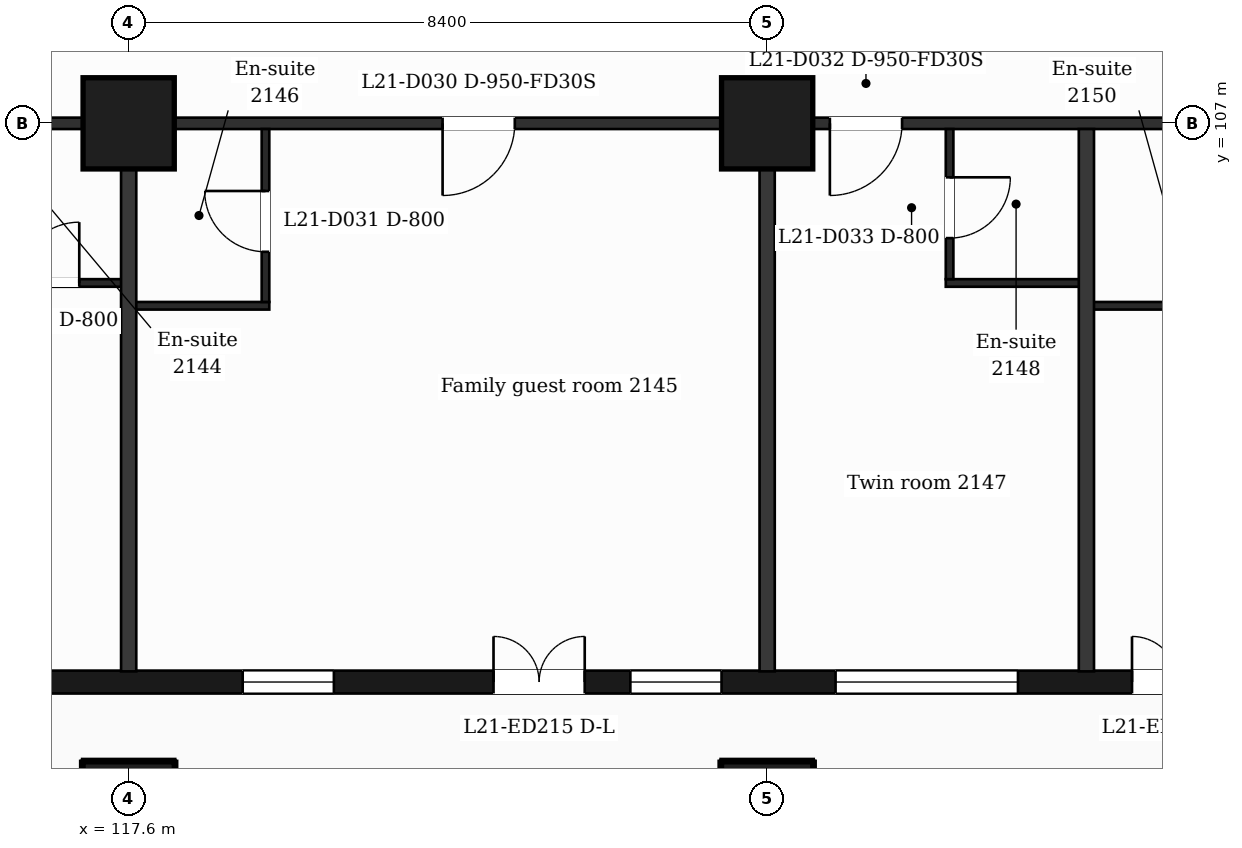
"""IFC4 building model, lengths in metres.
Left out: names, types, materials, properties, quantities, classifications, styles, units other than length and angle.
Written with IfcOpenShell. Run it as: python <this file> out.ifc"""

import sys

from ifc_helpers import new_model, si_unit, direction, frame, frame_2d, origin, origin_2d, place, context, subcontext, project, spatial, rectangle, extrude, element, fill, save


model = new_model("IFC4")
c1 = context("Model", 3, precision=1e-05, world=origin(), true_north=direction((0.0, 1.0)))
c2 = subcontext(c1, "Body", "Model", "MODEL_VIEW")
j1 = project(units=[si_unit("LENGTHUNIT", "METRE"), si_unit("PLANEANGLEUNIT", "RADIAN")], contexts=[c1])
p1 = place(None, origin())
s1 = spatial("IfcSite", under=j1, at=p1, CompositionType="ELEMENT")
p2 = place(p1, origin())
s2 = spatial("IfcBuilding", under=s1, at=p2, CompositionType="ELEMENT")
p3 = place(p2, frame((0.0, 0.0, 94.7)))
s3 = spatial("IfcBuildingStorey", under=s2, at=p3, CompositionType="ELEMENT", Elevation=94.7)
for number, where, z_axis, x_axis in (
    (1, (117.6, 98.0, 0.0), (0.0, 0.0, 1.0), (1.0, 0.0, 0.0)),
    (2, (126.0, 98.0, 0.0), (0.0, 0.0, 1.0), (1.0, 0.0, 0.0)),
    (3, (117.6, 107.0, 0.0), (0.0, 0.0, 1.0), (1.0, 0.0, 0.0)),
    (4, (126.0, 107.0, 0.0), (0.0, 0.0, 1.0), (1.0, 0.0, 0.0)),
):
    element("IfcColumn", number, at=place(p3, frame(where, z_axis=z_axis, x_axis=x_axis)), inside=s3, PredefinedType="COLUMN", context=c2, shape_type="SweptSolid", body=[
        extrude(rectangle(XDim=1.2, YDim=1.2, at=origin_2d()), origin(), (0.0, 0.0, 1.0), 3.7),
    ])
p4 = place(p3, frame((89.85, 99.65, 0.0), z_axis=(0.0, 0.0, 1.0), x_axis=(1.0, 0.0, 0.0)))
e5 = element("IfcWall", 5, at=p4, inside=s3, PredefinedType="SOLIDWALL", context=c2, shape_type="SweptSolid", body=[
    extrude(rectangle(XDim=47.25, YDim=0.3, at=frame_2d((23.625, 0.0))), origin(), (0.0, 0.0, 1.0), 3.38),
])
p5 = place(p4, frame((0.725, 0.0, 0.9)))
e6 = element("IfcOpeningElement", 6, at=p5, cuts=e5, PredefinedType="OPENING", context=c2, shape_type="SweptSolid", body=[
    extrude(rectangle(XDim=1.2, YDim=2.1, at=frame_2d((0.6, 1.05))), frame((0.0, 0.16, 0.0), z_axis=(0.0, -1.0, 0.0), x_axis=(1.0, 0.0, 0.0)), (0.0, 0.0, 1.0), 0.32),
])
p6 = place(p4, frame((3.45, 0.0, 0.9)))
e7 = element("IfcOpeningElement", 7, at=p6, cuts=e5, PredefinedType="OPENING", context=c2, shape_type="SweptSolid", body=[
    extrude(rectangle(XDim=2.4, YDim=2.1, at=frame_2d((1.2, 1.05))), frame((0.0, 0.16, 0.0), z_axis=(0.0, -1.0, 0.0), x_axis=(1.0, 0.0, 0.0)), (0.0, 0.0, 1.0), 0.32),
])
p7 = place(p4, frame((7.65, 0.0, 0.9)))
e8 = element("IfcOpeningElement", 8, at=p7, cuts=e5, PredefinedType="OPENING", context=c2, shape_type="SweptSolid", body=[
    extrude(rectangle(XDim=2.4, YDim=2.1, at=frame_2d((1.2, 1.05))), frame((0.0, 0.16, 0.0), z_axis=(0.0, -1.0, 0.0), x_axis=(1.0, 0.0, 0.0)), (0.0, 0.0, 1.0), 0.32),
])
p8 = place(p4, frame((11.85, 0.0, 0.9)))
e9 = element("IfcOpeningElement", 9, at=p8, cuts=e5, PredefinedType="OPENING", context=c2, shape_type="SweptSolid", body=[
    extrude(rectangle(XDim=2.4, YDim=2.1, at=frame_2d((1.2, 1.05))), frame((0.0, 0.16, 0.0), z_axis=(0.0, -1.0, 0.0), x_axis=(1.0, 0.0, 0.0)), (0.0, 0.0, 1.0), 0.32),
])
p9 = place(p4, frame((16.05, 0.0, 0.9)))
e10 = element("IfcOpeningElement", 10, at=p9, cuts=e5, PredefinedType="OPENING", context=c2, shape_type="SweptSolid", body=[
    extrude(rectangle(XDim=2.4, YDim=2.1, at=frame_2d((1.2, 1.05))), frame((0.0, 0.16, 0.0), z_axis=(0.0, -1.0, 0.0), x_axis=(1.0, 0.0, 0.0)), (0.0, 0.0, 1.0), 0.32),
])
p10 = place(p4, frame((20.25, 0.0, 0.9)))
e11 = element("IfcOpeningElement", 11, at=p10, cuts=e5, PredefinedType="OPENING", context=c2, shape_type="SweptSolid", body=[
    extrude(rectangle(XDim=2.4, YDim=2.1, at=frame_2d((1.2, 1.05))), frame((0.0, 0.16, 0.0), z_axis=(0.0, -1.0, 0.0), x_axis=(1.0, 0.0, 0.0)), (0.0, 0.0, 1.0), 0.32),
])
p11 = place(p4, frame((25.05, 0.0, 0.9)))
e12 = element("IfcOpeningElement", 12, at=p11, cuts=e5, PredefinedType="OPENING", context=c2, shape_type="SweptSolid", body=[
    extrude(rectangle(XDim=1.2, YDim=2.1, at=frame_2d((0.6, 1.05))), frame((0.0, 0.16, 0.0), z_axis=(0.0, -1.0, 0.0), x_axis=(1.0, 0.0, 0.0)), (0.0, 0.0, 1.0), 0.32),
])
p12 = place(p4, frame((29.25, 0.0, 0.9)))
e13 = element("IfcOpeningElement", 13, at=p12, cuts=e5, PredefinedType="OPENING", context=c2, shape_type="SweptSolid", body=[
    extrude(rectangle(XDim=1.2, YDim=2.1, at=frame_2d((0.6, 1.05))), frame((0.0, 0.16, 0.0), z_axis=(0.0, -1.0, 0.0), x_axis=(1.0, 0.0, 0.0)), (0.0, 0.0, 1.0), 0.32),
])
p13 = place(p4, frame((32.55, 0.0, 0.0)))
e14 = element("IfcOpeningElement", 14, at=p13, cuts=e5, PredefinedType="OPENING", context=c2, shape_type="SweptSolid", body=[
    extrude(rectangle(XDim=1.2, YDim=2.4, at=frame_2d((0.6, 1.2))), frame((0.0, 0.16, 0.0), z_axis=(0.0, -1.0, 0.0), x_axis=(1.0, 0.0, 0.0)), (0.0, 0.0, 1.0), 0.32),
])
p14 = place(p4, frame((34.35, 0.0, 0.9)))
e15 = element("IfcOpeningElement", 15, at=p14, cuts=e5, PredefinedType="OPENING", context=c2, shape_type="SweptSolid", body=[
    extrude(rectangle(XDim=1.2, YDim=2.1, at=frame_2d((0.6, 1.05))), frame((0.0, 0.16, 0.0), z_axis=(0.0, -1.0, 0.0), x_axis=(1.0, 0.0, 0.0)), (0.0, 0.0, 1.0), 0.32),
])
p15 = place(p4, frame((37.05, 0.0, 0.9)))
e16 = element("IfcOpeningElement", 16, at=p15, cuts=e5, PredefinedType="OPENING", context=c2, shape_type="SweptSolid", body=[
    extrude(rectangle(XDim=2.4, YDim=2.1, at=frame_2d((1.2, 1.05))), frame((0.0, 0.16, 0.0), z_axis=(0.0, -1.0, 0.0), x_axis=(1.0, 0.0, 0.0)), (0.0, 0.0, 1.0), 0.32),
])
p16 = place(p4, frame((40.95, 0.0, 0.0)))
e17 = element("IfcOpeningElement", 17, at=p16, cuts=e5, PredefinedType="OPENING", context=c2, shape_type="SweptSolid", body=[
    extrude(rectangle(XDim=1.2, YDim=2.4, at=frame_2d((0.6, 1.2))), frame((0.0, 0.16, 0.0), z_axis=(0.0, -1.0, 0.0), x_axis=(1.0, 0.0, 0.0)), (0.0, 0.0, 1.0), 0.32),
])
p17 = place(p4, frame((42.75, 0.0, 0.9)))
e18 = element("IfcOpeningElement", 18, at=p17, cuts=e5, PredefinedType="OPENING", context=c2, shape_type="SweptSolid", body=[
    extrude(rectangle(XDim=1.2, YDim=2.1, at=frame_2d((0.6, 1.05))), frame((0.0, 0.16, 0.0), z_axis=(0.0, -1.0, 0.0), x_axis=(1.0, 0.0, 0.0)), (0.0, 0.0, 1.0), 0.32),
])
p18 = place(p4, frame((45.25, 0.0, 0.9)))
e19 = element("IfcOpeningElement", 19, at=p18, cuts=e5, PredefinedType="OPENING", context=c2, shape_type="SweptSolid", body=[
    extrude(rectangle(XDim=1.2, YDim=2.1, at=frame_2d((0.6, 1.05))), frame((0.0, 0.16, 0.0), z_axis=(0.0, -1.0, 0.0), x_axis=(1.0, 0.0, 0.0)), (0.0, 0.0, 1.0), 0.32),
])
p19 = place(p3, frame((117.6, 104.6, 0.0), z_axis=(0.0, 0.0, 1.0), x_axis=(1.0, 0.0, 0.0)))
e20 = element("IfcWall", 20, at=p19, inside=s3, PredefinedType="PARTITIONING", context=c2, shape_type="SweptSolid", body=[
    extrude(rectangle(XDim=1.85, YDim=0.1, at=frame_2d((0.925, 0.0))), origin(), (0.0, 0.0, 1.0), 3.38),
])
p20 = place(p3, frame((130.2, 104.6, 0.0), z_axis=(0.0, 0.0, 1.0), x_axis=(1.0, 0.0, 0.0)))
e21 = element("IfcWall", 21, at=p20, inside=s3, PredefinedType="PARTITIONING", context=c2, shape_type="SweptSolid", body=[
    extrude(rectangle(XDim=2.15, YDim=0.1, at=frame_2d((1.075, 0.0))), origin(), (0.0, 0.0, 1.0), 3.38),
])
p21 = place(p3, frame((115.45, 104.9, 0.0), z_axis=(0.0, 0.0, 1.0), x_axis=(1.0, 0.0, 0.0)))
e22 = element("IfcWall", 22, at=p21, inside=s3, PredefinedType="PARTITIONING", context=c2, shape_type="SweptSolid", body=[
    extrude(rectangle(XDim=2.15, YDim=0.1, at=frame_2d((1.075, 0.0))), origin(), (0.0, 0.0, 1.0), 3.38),
])
p22 = place(p21, frame((0.7, 0.0, 0.0)))
e23 = element("IfcOpeningElement", 23, at=p22, cuts=e22, PredefinedType="OPENING", context=c2, shape_type="SweptSolid", body=[
    extrude(rectangle(XDim=0.8, YDim=2.1, at=frame_2d((0.4, 1.05))), frame((0.0, 0.06, 0.0), z_axis=(0.0, -1.0, 0.0), x_axis=(1.0, 0.0, 0.0)), (0.0, 0.0, 1.0), 0.12),
])
p23 = place(p3, frame((128.35, 104.9, 0.0), z_axis=(0.0, 0.0, 1.0), x_axis=(1.0, 0.0, 0.0)))
e24 = element("IfcWall", 24, at=p23, inside=s3, PredefinedType="PARTITIONING", context=c2, shape_type="SweptSolid", body=[
    extrude(rectangle(XDim=1.85, YDim=0.1, at=frame_2d((0.925, 0.0))), origin(), (0.0, 0.0, 1.0), 3.38),
])
p24 = place(p3, frame((87.018, 107.0, 0.0), z_axis=(0.0, 0.0, 1.0), x_axis=(1.0, 0.0, 0.0)))
e25 = element("IfcWall", 25, at=p24, inside=s3, PredefinedType="PARTITIONING", context=c2, shape_type="SweptSolid", body=[
    extrude(rectangle(XDim=52.765, YDim=0.15, at=frame_2d((26.382, 0.0))), origin(), (0.0, 0.0, 1.0), 3.38),
])
p25 = place(p24, frame((0.707, 0.0, 0.0)))
e26 = element("IfcOpeningElement", 26, at=p25, cuts=e25, PredefinedType="OPENING", context=c2, shape_type="SweptSolid", body=[
    extrude(rectangle(XDim=0.95, YDim=2.1, at=frame_2d((0.475, 1.05))), frame((0.0, 0.085, 0.0), z_axis=(0.0, -1.0, 0.0), x_axis=(1.0, 0.0, 0.0)), (0.0, 0.0, 1.0), 0.17),
])
p26 = place(p24, frame((6.982, 0.0, 0.0)))
e27 = element("IfcOpeningElement", 27, at=p26, cuts=e25, PredefinedType="OPENING", context=c2, shape_type="SweptSolid", body=[
    extrude(rectangle(XDim=1.0, YDim=2.1, at=frame_2d((0.5, 1.05))), frame((0.0, 0.085, 0.0), z_axis=(0.0, -1.0, 0.0), x_axis=(1.0, 0.0, 0.0)), (0.0, 0.0, 1.0), 0.17),
])
p27 = place(p24, frame((16.457, 0.0, 0.0)))
e28 = element("IfcOpeningElement", 28, at=p27, cuts=e25, PredefinedType="OPENING", context=c2, shape_type="SweptSolid", body=[
    extrude(rectangle(XDim=0.95, YDim=2.1, at=frame_2d((0.475, 1.05))), frame((0.0, 0.085, 0.0), z_axis=(0.0, -1.0, 0.0), x_axis=(1.0, 0.0, 0.0)), (0.0, 0.0, 1.0), 0.17),
])
p28 = place(p24, frame((18.445, 0.0, 0.0)))
e29 = element("IfcOpeningElement", 29, at=p28, cuts=e25, PredefinedType="OPENING", context=c2, shape_type="SweptSolid", body=[
    extrude(rectangle(XDim=0.95, YDim=2.1, at=frame_2d((0.475, 1.05))), frame((0.0, 0.085, 0.0), z_axis=(0.0, -1.0, 0.0), x_axis=(1.0, 0.0, 0.0)), (0.0, 0.0, 1.0), 0.17),
])
p29 = place(p24, frame((25.157, 0.0, 0.0)))
e30 = element("IfcOpeningElement", 30, at=p29, cuts=e25, PredefinedType="OPENING", context=c2, shape_type="SweptSolid", body=[
    extrude(rectangle(XDim=0.95, YDim=2.1, at=frame_2d((0.475, 1.05))), frame((0.0, 0.085, 0.0), z_axis=(0.0, -1.0, 0.0), x_axis=(1.0, 0.0, 0.0)), (0.0, 0.0, 1.0), 0.17),
])
p30 = place(p24, frame((27.07, 0.0, 0.0)))
e31 = element("IfcOpeningElement", 31, at=p30, cuts=e25, PredefinedType="OPENING", context=c2, shape_type="SweptSolid", body=[
    extrude(rectangle(XDim=0.95, YDim=2.1, at=frame_2d((0.475, 1.05))), frame((0.0, 0.085, 0.0), z_axis=(0.0, -1.0, 0.0), x_axis=(1.0, 0.0, 0.0)), (0.0, 0.0, 1.0), 0.17),
])
p31 = place(p24, frame((34.712, 0.0, 0.0)))
e32 = element("IfcOpeningElement", 32, at=p31, cuts=e25, PredefinedType="OPENING", context=c2, shape_type="SweptSolid", body=[
    extrude(rectangle(XDim=0.95, YDim=2.1, at=frame_2d((0.475, 1.05))), frame((0.0, 0.085, 0.0), z_axis=(0.0, -1.0, 0.0), x_axis=(1.0, 0.0, 0.0)), (0.0, 0.0, 1.0), 0.17),
])
p32 = place(p24, frame((39.807, 0.0, 0.0)))
e33 = element("IfcOpeningElement", 33, at=p32, cuts=e25, PredefinedType="OPENING", context=c2, shape_type="SweptSolid", body=[
    extrude(rectangle(XDim=0.95, YDim=2.1, at=frame_2d((0.475, 1.05))), frame((0.0, 0.085, 0.0), z_axis=(0.0, -1.0, 0.0), x_axis=(1.0, 0.0, 0.0)), (0.0, 0.0, 1.0), 0.17),
])
p33 = place(p24, frame((45.622, 0.0, 0.0)))
e34 = element("IfcOpeningElement", 34, at=p33, cuts=e25, PredefinedType="OPENING", context=c2, shape_type="SweptSolid", body=[
    extrude(rectangle(XDim=0.95, YDim=2.1, at=frame_2d((0.475, 1.05))), frame((0.0, 0.085, 0.0), z_axis=(0.0, -1.0, 0.0), x_axis=(1.0, 0.0, 0.0)), (0.0, 0.0, 1.0), 0.17),
])
p34 = place(p24, frame((48.974, 0.0, 0.0)))
e35 = element("IfcOpeningElement", 35, at=p34, cuts=e25, PredefinedType="OPENING", context=c2, shape_type="SweptSolid", body=[
    extrude(rectangle(XDim=0.95, YDim=2.1, at=frame_2d((0.475, 1.05))), frame((0.0, 0.085, 0.0), z_axis=(0.0, -1.0, 0.0), x_axis=(1.0, 0.0, 0.0)), (0.0, 0.0, 1.0), 0.17),
])
p35 = place(p3, frame((117.6, 99.79, 0.0), z_axis=(0.0, 0.0, 1.0), x_axis=(0.0, 1.0, 0.0)))
e36 = element("IfcWall", 36, at=p35, inside=s3, PredefinedType="PARTITIONING", context=c2, shape_type="SweptSolid", body=[
    extrude(rectangle(XDim=7.135, YDim=0.2, at=frame_2d((3.567, 0.0))), origin(), (0.0, 0.0, 1.0), 3.38),
])
p36 = place(p3, frame((119.4, 104.65, 0.0), z_axis=(0.0, 0.0, 1.0), x_axis=(0.0, 1.0, 0.0)))
e37 = element("IfcWall", 37, at=p36, inside=s3, PredefinedType="PARTITIONING", context=c2, shape_type="SweptSolid", body=[
    extrude(rectangle(XDim=2.275, YDim=0.1, at=frame_2d((1.138, 0.0))), origin(), (0.0, 0.0, 1.0), 3.38),
])
p37 = place(p36, frame((0.66, 0.0, 0.0)))
e38 = element("IfcOpeningElement", 38, at=p37, cuts=e37, PredefinedType="OPENING", context=c2, shape_type="SweptSolid", body=[
    extrude(rectangle(XDim=0.8, YDim=2.1, at=frame_2d((0.4, 1.05))), frame((0.0, 0.06, 0.0), z_axis=(0.0, -1.0, 0.0), x_axis=(1.0, 0.0, 0.0)), (0.0, 0.0, 1.0), 0.12),
])
p38 = place(p3, frame((126.0, 99.79, 0.0), z_axis=(0.0, 0.0, 1.0), x_axis=(0.0, 1.0, 0.0)))
e39 = element("IfcWall", 39, at=p38, inside=s3, PredefinedType="PARTITIONING", context=c2, shape_type="SweptSolid", body=[
    extrude(rectangle(XDim=7.135, YDim=0.2, at=frame_2d((3.567, 0.0))), origin(), (0.0, 0.0, 1.0), 3.38),
])
p39 = place(p3, frame((128.4, 104.95, 0.0), z_axis=(0.0, 0.0, 1.0), x_axis=(0.0, 1.0, 0.0)))
e40 = element("IfcWall", 40, at=p39, inside=s3, PredefinedType="PARTITIONING", context=c2, shape_type="SweptSolid", body=[
    extrude(rectangle(XDim=1.975, YDim=0.1, at=frame_2d((0.988, 0.0))), origin(), (0.0, 0.0, 1.0), 3.38),
])
p40 = place(p39, frame((0.54, 0.0, 0.0)))
e41 = element("IfcOpeningElement", 41, at=p40, cuts=e40, PredefinedType="OPENING", context=c2, shape_type="SweptSolid", body=[
    extrude(rectangle(XDim=0.8, YDim=2.1, at=frame_2d((0.4, 1.05))), frame((0.0, 0.06, 0.0), z_axis=(0.0, -1.0, 0.0), x_axis=(1.0, 0.0, 0.0)), (0.0, 0.0, 1.0), 0.12),
])
p41 = place(p3, frame((130.2, 99.79, 0.0), z_axis=(0.0, 0.0, 1.0), x_axis=(0.0, 1.0, 0.0)))
e42 = element("IfcWall", 42, at=p41, inside=s3, PredefinedType="PARTITIONING", context=c2, shape_type="SweptSolid", body=[
    extrude(rectangle(XDim=7.135, YDim=0.2, at=frame_2d((3.567, 0.0))), origin(), (0.0, 0.0, 1.0), 3.38),
])
p42 = place(p12, origin())
e43 = element("IfcWindow", 43, at=p42, inside=s3, PartitioningType="SINGLE_PANEL", PredefinedType="WINDOW", context=c2, shape_type="SweptSolid", body=[
    extrude(rectangle(XDim=1.2, YDim=2.1, at=frame_2d((0.6, 1.05))), frame((0.0, 0.03, 0.0), z_axis=(0.0, -1.0, 0.0), x_axis=(1.0, 0.0, 0.0)), (0.0, 0.0, 1.0), 0.06),
])
fill(e13, e43)
p43 = place(p13, origin())
e44 = element("IfcDoor", 44, at=p43, inside=s3, OperationType="DOUBLE_DOOR_SINGLE_SWING", PredefinedType="DOOR", context=c2, shape_type="SweptSolid", body=[
    extrude(rectangle(XDim=1.2, YDim=2.4, at=frame_2d((0.6, 1.2))), frame((0.0, 0.025, 0.0), z_axis=(0.0, -1.0, 0.0), x_axis=(1.0, 0.0, 0.0)), (0.0, 0.0, 1.0), 0.05),
])
fill(e14, e44)
p44 = place(p14, origin())
e45 = element("IfcWindow", 45, at=p44, inside=s3, PartitioningType="SINGLE_PANEL", PredefinedType="WINDOW", context=c2, shape_type="SweptSolid", body=[
    extrude(rectangle(XDim=1.2, YDim=2.1, at=frame_2d((0.6, 1.05))), frame((0.0, 0.03, 0.0), z_axis=(0.0, -1.0, 0.0), x_axis=(1.0, 0.0, 0.0)), (0.0, 0.0, 1.0), 0.06),
])
fill(e15, e45)
p45 = place(p15, origin())
e46 = element("IfcWindow", 46, at=p45, inside=s3, PartitioningType="SINGLE_PANEL", PredefinedType="WINDOW", context=c2, shape_type="SweptSolid", body=[
    extrude(rectangle(XDim=2.4, YDim=2.1, at=frame_2d((1.2, 1.05))), frame((0.0, 0.03, 0.0), z_axis=(0.0, -1.0, 0.0), x_axis=(1.0, 0.0, 0.0)), (0.0, 0.0, 1.0), 0.06),
])
fill(e16, e46)
p46 = place(p16, origin())
e47 = element("IfcDoor", 47, at=p46, inside=s3, OperationType="DOUBLE_DOOR_SINGLE_SWING", PredefinedType="DOOR", context=c2, shape_type="SweptSolid", body=[
    extrude(rectangle(XDim=1.2, YDim=2.4, at=frame_2d((0.6, 1.2))), frame((0.0, 0.025, 0.0), z_axis=(0.0, -1.0, 0.0), x_axis=(1.0, 0.0, 0.0)), (0.0, 0.0, 1.0), 0.05),
])
fill(e17, e47)
p47 = place(p22, origin())
e48 = element("IfcDoor", 48, at=p47, inside=s3, OperationType="SINGLE_SWING_RIGHT", PredefinedType="DOOR", context=c2, shape_type="SweptSolid", body=[
    extrude(rectangle(XDim=0.8, YDim=2.1, at=frame_2d((0.4, 1.05))), frame((0.0, 0.025, 0.0), z_axis=(0.0, -1.0, 0.0), x_axis=(1.0, 0.0, 0.0)), (0.0, 0.0, 1.0), 0.05),
])
fill(e23, e48)
p48 = place(p31, origin())
e49 = element("IfcDoor", 49, at=p48, inside=s3, OperationType="SINGLE_SWING_LEFT", PredefinedType="DOOR", context=c2, shape_type="SweptSolid", body=[
    extrude(rectangle(XDim=0.95, YDim=2.1, at=frame_2d((0.475, 1.05))), frame((0.0, 0.025, 0.0), z_axis=(0.0, -1.0, 0.0), x_axis=(1.0, 0.0, 0.0)), (0.0, 0.0, 1.0), 0.05),
])
fill(e32, e49)
p49 = place(p37, origin())
e50 = element("IfcDoor", 50, at=p49, inside=s3, OperationType="SINGLE_SWING_RIGHT", PredefinedType="DOOR", context=c2, shape_type="SweptSolid", body=[
    extrude(rectangle(XDim=0.8, YDim=2.1, at=frame_2d((0.4, 1.05))), frame((0.0, 0.025, 0.0), z_axis=(0.0, -1.0, 0.0), x_axis=(1.0, 0.0, 0.0)), (0.0, 0.0, 1.0), 0.05),
])
fill(e38, e50)
p50 = place(p32, origin())
e51 = element("IfcDoor", 51, at=p50, inside=s3, OperationType="SINGLE_SWING_LEFT", PredefinedType="DOOR", context=c2, shape_type="SweptSolid", body=[
    extrude(rectangle(XDim=0.95, YDim=2.1, at=frame_2d((0.475, 1.05))), frame((0.0, 0.025, 0.0), z_axis=(0.0, -1.0, 0.0), x_axis=(1.0, 0.0, 0.0)), (0.0, 0.0, 1.0), 0.05),
])
fill(e33, e51)
p51 = place(p40, origin())
e52 = element("IfcDoor", 52, at=p51, inside=s3, OperationType="SINGLE_SWING_RIGHT", PredefinedType="DOOR", context=c2, shape_type="SweptSolid", body=[
    extrude(rectangle(XDim=0.8, YDim=2.1, at=frame_2d((0.4, 1.05))), frame((0.0, 0.025, 0.0), z_axis=(0.0, -1.0, 0.0), x_axis=(1.0, 0.0, 0.0)), (0.0, 0.0, 1.0), 0.05),
])
fill(e41, e52)
save(model, sys.argv[1])
